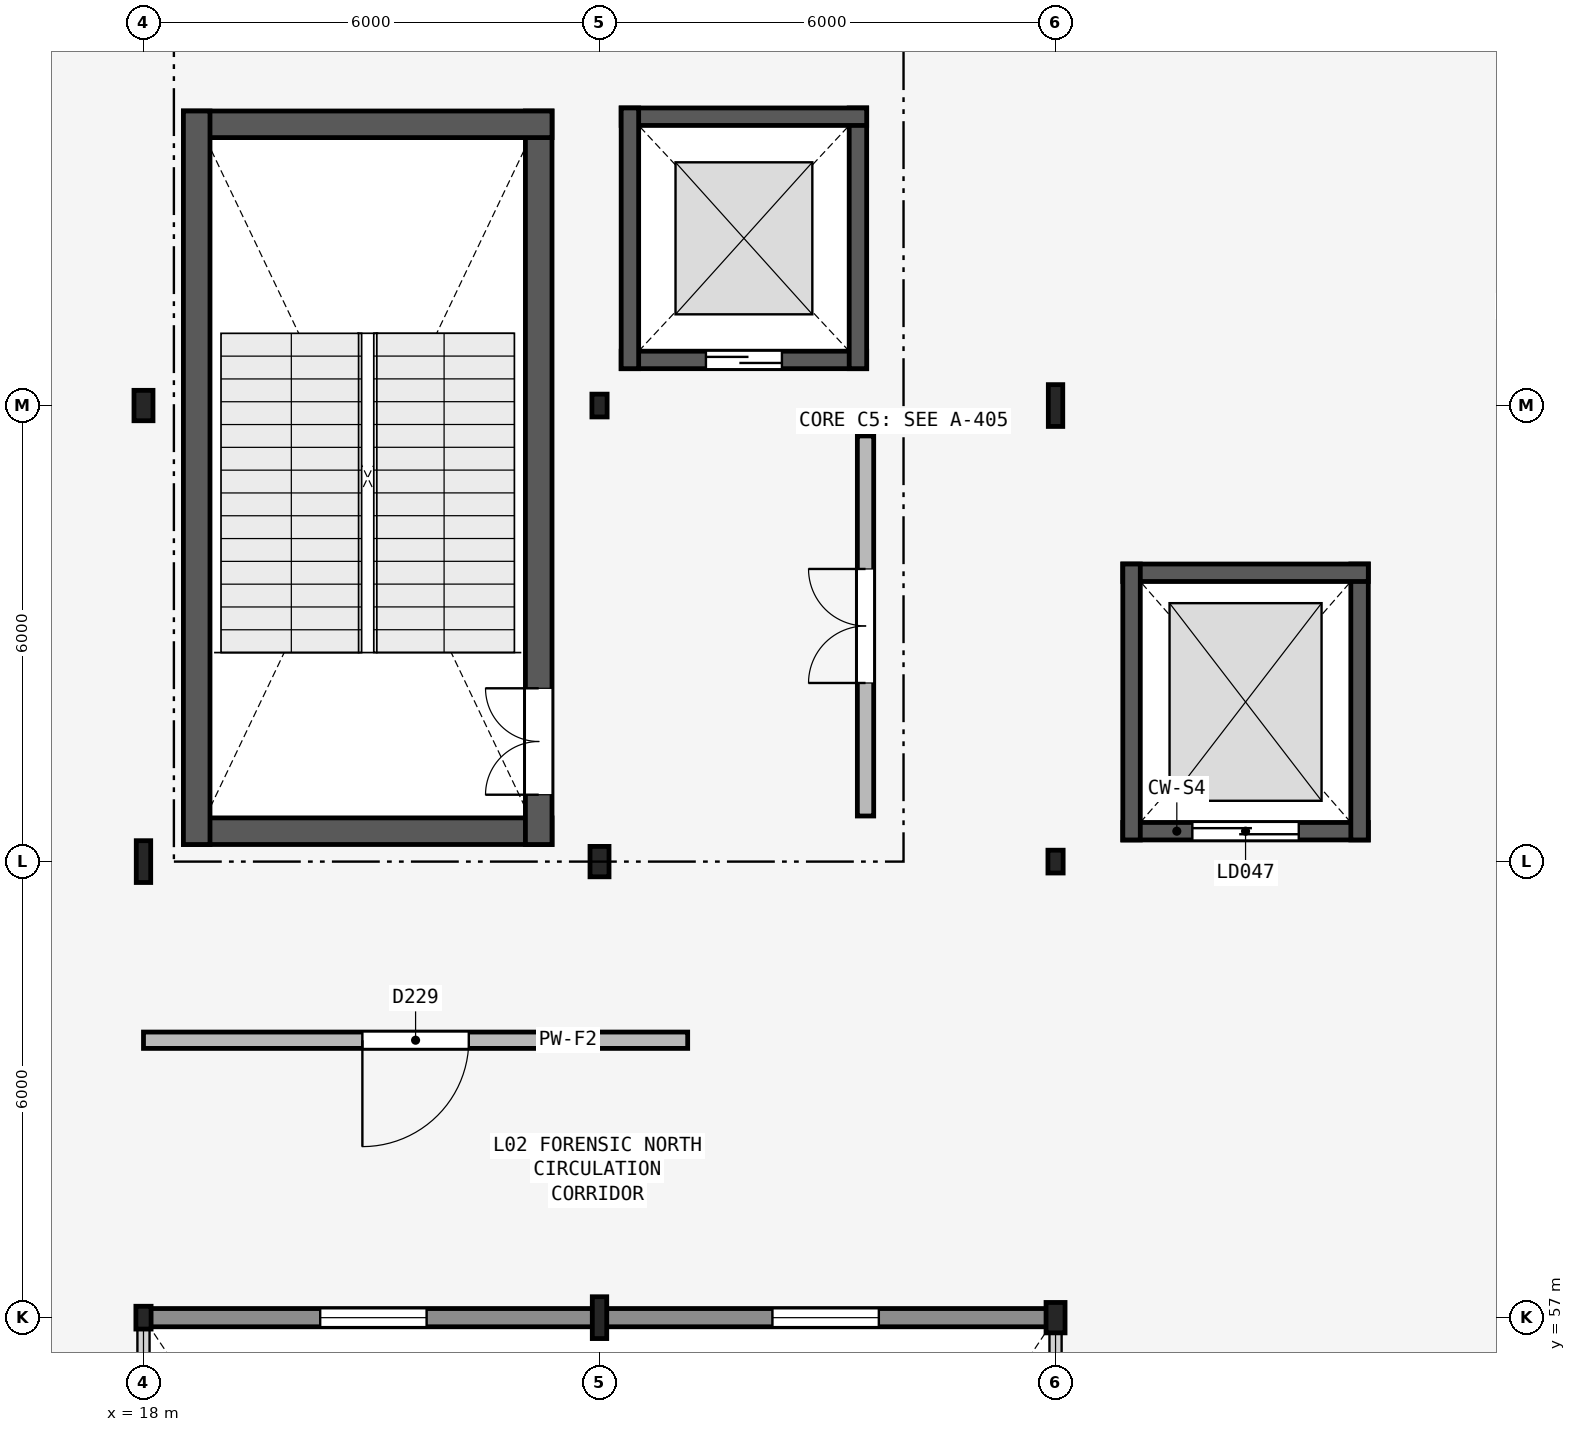
"""IFC4 building model, lengths in metres.
Left out: names, types, materials, properties, quantities, classifications, styles, units other than length and angle.
Written with IfcOpenShell. Run it as: python <this file> out.ifc"""

import sys

from ifc_helpers import new_model, si_unit, direction, frame, frame_2d, origin, origin_2d, place, context, subcontext, project, spatial, rectangle, hollow_rectangle, i_section, extrude, element, fill, save


model = new_model("IFC4")
c1 = context("Model", 3, precision=1e-05, world=origin(), true_north=direction((0.0, 1.0)))
c2 = subcontext(c1, "Body", "Model", "MODEL_VIEW")
j1 = project(units=[si_unit("LENGTHUNIT", "METRE"), si_unit("PLANEANGLEUNIT", "RADIAN")], contexts=[c1])
p1 = place(None, origin())
s1 = spatial("IfcSite", under=j1, at=p1, CompositionType="ELEMENT")
p2 = place(p1, origin())
s2 = spatial("IfcBuilding", under=s1, at=p2, CompositionType="ELEMENT")
p3 = place(p2, frame((0.0, 0.0, 9.3)))
s3 = spatial("IfcBuildingStorey", under=s2, at=p3, CompositionType="ELEMENT", Elevation=9.3)
p4 = place(p3, frame((18.0, 57.0, 0.0), z_axis=(0.0, 0.0, 1.0), x_axis=(1.0, 0.0, 0.0)))
e1 = element("IfcColumn", 1, at=p4, inside=s3, PredefinedType="COLUMN", context=c2, shape_type="SweptSolid", body=[
    extrude(hollow_rectangle(XDim=0.2, YDim=0.3, WallThickness=0.012, InnerFilletRadius=0.012, OuterFilletRadius=0.024, at=origin_2d()), origin(), (0.0, 0.0, 1.0), 4.2),
])
p5 = place(p3, frame((18.0, 63.0, 0.0), z_axis=(0.0, 0.0, 1.0), x_axis=(1.0, 0.0, 0.0)))
e2 = element("IfcColumn", 2, at=p5, inside=s3, PredefinedType="COLUMN", context=c2, shape_type="SweptSolid", body=[
    extrude(i_section(OverallWidth=0.19, OverallDepth=0.55, WebThickness=0.011, FlangeThickness=0.019, FilletRadius=0.018, at=origin_2d()), origin(), (0.0, 0.0, 1.0), 4.2),
])
p6 = place(p3, frame((18.0, 69.0, 0.0), z_axis=(0.0, 0.0, 1.0), x_axis=(1.0, 0.0, 0.0)))
e3 = element("IfcColumn", 3, at=p6, inside=s3, PredefinedType="COLUMN", context=c2, shape_type="SweptSolid", body=[
    extrude(i_section(OverallWidth=0.25, OverallDepth=0.4, WebThickness=0.01, FlangeThickness=0.013, FilletRadius=0.014, at=origin_2d()), origin(), (0.0, 0.0, 1.0), 4.2),
])
p7 = place(p3, frame((24.0, 57.0, 0.0), z_axis=(0.0, 0.0, 1.0), x_axis=(1.0, 0.0, 0.0)))
e4 = element("IfcColumn", 4, at=p7, inside=s3, PredefinedType="COLUMN", context=c2, shape_type="SweptSolid", body=[
    extrude(i_section(OverallWidth=0.19, OverallDepth=0.55, WebThickness=0.011, FlangeThickness=0.019, FilletRadius=0.018, at=origin_2d()), origin(), (0.0, 0.0, 1.0), 4.2),
])
p8 = place(p3, frame((24.0, 63.0, 0.0), z_axis=(0.0, 0.0, 1.0), x_axis=(1.0, 0.0, 0.0)))
e5 = element("IfcColumn", 5, at=p8, inside=s3, PredefinedType="COLUMN", context=c2, shape_type="SweptSolid", body=[
    extrude(i_section(OverallWidth=0.25, OverallDepth=0.4, WebThickness=0.01, FlangeThickness=0.013, FilletRadius=0.014, at=origin_2d()), origin(), (0.0, 0.0, 1.0), 4.2),
])
p9 = place(p3, frame((24.0, 69.0, 0.0), z_axis=(0.0, 0.0, 1.0), x_axis=(1.0, 0.0, 0.0)))
e6 = element("IfcColumn", 6, at=p9, inside=s3, PredefinedType="COLUMN", context=c2, shape_type="SweptSolid", body=[
    extrude(hollow_rectangle(XDim=0.2, YDim=0.3, WallThickness=0.012, InnerFilletRadius=0.012, OuterFilletRadius=0.024, at=origin_2d()), origin(), (0.0, 0.0, 1.0), 4.2),
])
p10 = place(p3, frame((30.0, 57.0, 0.0), z_axis=(0.0, 0.0, 1.0), x_axis=(1.0, 0.0, 0.0)))
e7 = element("IfcColumn", 7, at=p10, inside=s3, PredefinedType="COLUMN", context=c2, shape_type="SweptSolid", body=[
    extrude(i_section(OverallWidth=0.25, OverallDepth=0.4, WebThickness=0.01, FlangeThickness=0.013, FilletRadius=0.014, at=origin_2d()), origin(), (0.0, 0.0, 1.0), 4.2),
])
p11 = place(p3, frame((30.0, 63.0, 0.0), z_axis=(0.0, 0.0, 1.0), x_axis=(1.0, 0.0, 0.0)))
e8 = element("IfcColumn", 8, at=p11, inside=s3, PredefinedType="COLUMN", context=c2, shape_type="SweptSolid", body=[
    extrude(hollow_rectangle(XDim=0.2, YDim=0.3, WallThickness=0.012, InnerFilletRadius=0.012, OuterFilletRadius=0.024, at=origin_2d()), origin(), (0.0, 0.0, 1.0), 4.2),
])
p12 = place(p3, frame((30.0, 69.0, 0.0), z_axis=(0.0, 0.0, 1.0), x_axis=(1.0, 0.0, 0.0)))
e9 = element("IfcColumn", 9, at=p12, inside=s3, PredefinedType="COLUMN", context=c2, shape_type="SweptSolid", body=[
    extrude(i_section(OverallWidth=0.19, OverallDepth=0.55, WebThickness=0.011, FlangeThickness=0.019, FilletRadius=0.018, at=origin_2d()), origin(), (0.0, 0.0, 1.0), 4.2),
])
p13 = place(p3, frame((18.05, 57.0, 0.0), z_axis=(0.0, 0.0, 1.0), x_axis=(1.0, 0.0, 0.0)))
e10 = element("IfcWall", 10, at=p13, inside=s3, PredefinedType="SOLIDWALL", context=c2, shape_type="SweptSolid", body=[
    extrude(rectangle(XDim=5.95, YDim=0.24, at=frame_2d((2.975, 0.0))), origin(), (0.0, 0.0, 1.0), 3.29),
])
p14 = place(p13, frame((2.275, 0.0, 0.85)))
e11 = element("IfcOpeningElement", 11, at=p14, cuts=e10, PredefinedType="OPENING", context=c2, shape_type="SweptSolid", body=[
    extrude(rectangle(XDim=1.4, YDim=1.8, at=frame_2d((0.7, 0.9))), frame((0.0, 0.13, 0.0), z_axis=(0.0, -1.0, 0.0), x_axis=(1.0, 0.0, 0.0)), (0.0, 0.0, 1.0), 0.26),
])
p15 = place(p3, frame((24.0, 57.0, 0.0), z_axis=(0.0, 0.0, 1.0), x_axis=(1.0, 0.0, 0.0)))
e12 = element("IfcWall", 12, at=p15, inside=s3, PredefinedType="SOLIDWALL", context=c2, shape_type="SweptSolid", body=[
    extrude(rectangle(XDim=5.95, YDim=0.24, at=frame_2d((2.975, 0.0))), origin(), (0.0, 0.0, 1.0), 3.29),
])
p16 = place(p15, frame((2.275, 0.0, 0.85)))
e13 = element("IfcOpeningElement", 13, at=p16, cuts=e12, PredefinedType="OPENING", context=c2, shape_type="SweptSolid", body=[
    extrude(rectangle(XDim=1.4, YDim=1.8, at=frame_2d((0.7, 0.9))), frame((0.0, 0.13, 0.0), z_axis=(0.0, -1.0, 0.0), x_axis=(1.0, 0.0, 0.0)), (0.0, 0.0, 1.0), 0.26),
])
p17 = place(p3, frame((18.525, 63.4, 0.0), z_axis=(0.0, 0.0, 1.0), x_axis=(1.0, 0.0, 0.0)))
e14 = element("IfcWall", 14, at=p17, inside=s3, PredefinedType="SHEAR", context=c2, shape_type="SweptSolid", body=[
    extrude(rectangle(XDim=4.85, YDim=0.35, at=frame_2d((2.425, 0.0))), origin(), (0.0, 0.0, 1.0), 4.06),
])
p18 = place(p3, frame((23.2, 63.225, 0.0), z_axis=(0.0, 0.0, 1.0), x_axis=(0.0, 1.0, 0.0)))
e15 = element("IfcWall", 15, at=p18, inside=s3, PredefinedType="SHEAR", context=c2, shape_type="SweptSolid", body=[
    extrude(rectangle(XDim=9.65, YDim=0.35, at=frame_2d((4.825, 0.0))), origin(), (0.0, 0.0, 1.0), 4.06),
])
p19 = place(p18, frame((0.655, 0.0, 0.0)))
e16 = element("IfcOpeningElement", 16, at=p19, cuts=e15, PredefinedType="OPENING", context=c2, shape_type="SweptSolid", body=[
    extrude(rectangle(XDim=1.4, YDim=2.2, at=frame_2d((0.7, 1.1))), frame((0.0, 0.185, 0.0), z_axis=(0.0, -1.0, 0.0), x_axis=(1.0, 0.0, 0.0)), (0.0, 0.0, 1.0), 0.37),
])
p20 = place(p3, frame((23.375, 72.7, 0.0), z_axis=(0.0, 0.0, 1.0), x_axis=(-1.0, 0.0, 0.0)))
e17 = element("IfcWall", 17, at=p20, inside=s3, PredefinedType="SHEAR", context=c2, shape_type="SweptSolid", body=[
    extrude(rectangle(XDim=4.85, YDim=0.35, at=frame_2d((2.425, 0.0))), origin(), (0.0, 0.0, 1.0), 4.06),
])
p21 = place(p3, frame((18.7, 72.875, 0.0), z_axis=(0.0, 0.0, 1.0), x_axis=(0.0, -1.0, 0.0)))
e18 = element("IfcWall", 18, at=p21, inside=s3, PredefinedType="SHEAR", context=c2, shape_type="SweptSolid", body=[
    extrude(rectangle(XDim=9.65, YDim=0.35, at=frame_2d((4.825, 0.0))), origin(), (0.0, 0.0, 1.0), 4.06),
])
p22 = place(p3, frame((27.5, 63.6, 0.0), z_axis=(0.0, 0.0, 1.0), x_axis=(0.0, 1.0, 0.0)))
e19 = element("IfcWall", 19, at=p22, inside=s3, PredefinedType="PARTITIONING", context=c2, shape_type="SweptSolid", body=[
    extrude(rectangle(XDim=5.0, YDim=0.215, at=frame_2d((2.5, 0.0))), origin(), (0.0, 0.0, 1.0), 3.89),
])
p23 = place(p22, frame((1.75, 0.0, 0.0)))
e20 = element("IfcOpeningElement", 20, at=p23, cuts=e19, PredefinedType="OPENING", context=c2, shape_type="SweptSolid", body=[
    extrude(rectangle(XDim=1.5, YDim=2.15, at=frame_2d((0.75, 1.075))), frame((0.0, 0.117, 0.0), z_axis=(0.0, -1.0, 0.0), x_axis=(1.0, 0.0, 0.0)), (0.0, 0.0, 1.0), 0.235),
])
p24 = place(p3, frame((24.285, 69.6, 0.0), z_axis=(0.0, 0.0, 1.0), x_axis=(1.0, 0.0, 0.0)))
e21 = element("IfcWall", 21, at=p24, inside=s3, PredefinedType="SHEAR", context=c2, shape_type="SweptSolid", body=[
    extrude(rectangle(XDim=3.23, YDim=0.23, at=frame_2d((1.615, 0.0))), origin(), (0.0, 0.0, 1.0), 4.2),
])
p25 = place(p24, frame((1.115, 0.0, 0.0)))
e22 = element("IfcOpeningElement", 22, at=p25, cuts=e21, PredefinedType="OPENING", context=c2, shape_type="SweptSolid", body=[
    extrude(rectangle(XDim=1.0, YDim=2.15, at=frame_2d((0.5, 1.075))), frame((0.0, 0.125, 0.0), z_axis=(0.0, -1.0, 0.0), x_axis=(1.0, 0.0, 0.0)), (0.0, 0.0, 1.0), 0.25),
])
p26 = place(p3, frame((27.4, 69.485, 0.0), z_axis=(0.0, 0.0, 1.0), x_axis=(0.0, 1.0, 0.0)))
e23 = element("IfcWall", 23, at=p26, inside=s3, PredefinedType="SHEAR", context=c2, shape_type="SweptSolid", body=[
    extrude(rectangle(XDim=3.43, YDim=0.23, at=frame_2d((1.715, 0.0))), origin(), (0.0, 0.0, 1.0), 4.2),
])
p27 = place(p3, frame((27.515, 72.8, 0.0), z_axis=(0.0, 0.0, 1.0), x_axis=(-1.0, 0.0, 0.0)))
e24 = element("IfcWall", 24, at=p27, inside=s3, PredefinedType="SHEAR", context=c2, shape_type="SweptSolid", body=[
    extrude(rectangle(XDim=3.23, YDim=0.23, at=frame_2d((1.615, 0.0))), origin(), (0.0, 0.0, 1.0), 4.2),
])
p28 = place(p3, frame((24.4, 72.915, 0.0), z_axis=(0.0, 0.0, 1.0), x_axis=(0.0, -1.0, 0.0)))
e25 = element("IfcWall", 25, at=p28, inside=s3, PredefinedType="SHEAR", context=c2, shape_type="SweptSolid", body=[
    extrude(rectangle(XDim=3.43, YDim=0.23, at=frame_2d((1.715, 0.0))), origin(), (0.0, 0.0, 1.0), 4.2),
])
p29 = place(p3, frame((30.885, 63.4, 0.0), z_axis=(0.0, 0.0, 1.0), x_axis=(1.0, 0.0, 0.0)))
e26 = element("IfcWall", 26, at=p29, inside=s3, PredefinedType="SHEAR", context=c2, shape_type="SweptSolid", body=[
    extrude(rectangle(XDim=3.23, YDim=0.23, at=frame_2d((1.615, 0.0))), origin(), (0.0, 0.0, 1.0), 4.2),
])
p30 = place(p29, frame((0.915, 0.0, 0.0)))
e27 = element("IfcOpeningElement", 27, at=p30, cuts=e26, PredefinedType="OPENING", context=c2, shape_type="SweptSolid", body=[
    extrude(rectangle(XDim=1.4, YDim=2.3, at=frame_2d((0.7, 1.15))), frame((0.0, 0.125, 0.0), z_axis=(0.0, -1.0, 0.0), x_axis=(1.0, 0.0, 0.0)), (0.0, 0.0, 1.0), 0.25),
])
p31 = place(p3, frame((34.0, 63.285, 0.0), z_axis=(0.0, 0.0, 1.0), x_axis=(0.0, 1.0, 0.0)))
e28 = element("IfcWall", 28, at=p31, inside=s3, PredefinedType="SHEAR", context=c2, shape_type="SweptSolid", body=[
    extrude(rectangle(XDim=3.63, YDim=0.23, at=frame_2d((1.815, 0.0))), origin(), (0.0, 0.0, 1.0), 4.2),
])
p32 = place(p3, frame((34.115, 66.8, 0.0), z_axis=(0.0, 0.0, 1.0), x_axis=(-1.0, 0.0, 0.0)))
e29 = element("IfcWall", 29, at=p32, inside=s3, PredefinedType="SHEAR", context=c2, shape_type="SweptSolid", body=[
    extrude(rectangle(XDim=3.23, YDim=0.23, at=frame_2d((1.615, 0.0))), origin(), (0.0, 0.0, 1.0), 4.2),
])
p33 = place(p3, frame((31.0, 66.915, 0.0), z_axis=(0.0, 0.0, 1.0), x_axis=(0.0, -1.0, 0.0)))
e30 = element("IfcWall", 30, at=p33, inside=s3, PredefinedType="SHEAR", context=c2, shape_type="SweptSolid", body=[
    extrude(rectangle(XDim=3.63, YDim=0.23, at=frame_2d((1.815, 0.0))), origin(), (0.0, 0.0, 1.0), 4.2),
])
p34 = place(p3, frame((25.16, 60.65, 0.0), z_axis=(0.0, 0.0, 1.0), x_axis=(-1.0, 0.0, 0.0)))
e31 = element("IfcWall", 31, at=p34, inside=s3, PredefinedType="PARTITIONING", context=c2, shape_type="SweptSolid", body=[
    extrude(rectangle(XDim=7.16, YDim=0.215, at=frame_2d((3.58, 0.0))), origin(), (0.0, 0.0, 1.0), 3.49),
])
p35 = place(p34, frame((2.88, 0.0, 0.0)))
e32 = element("IfcOpeningElement", 32, at=p35, cuts=e31, PredefinedType="OPENING", context=c2, shape_type="SweptSolid", body=[
    extrude(rectangle(XDim=1.4, YDim=2.25, at=frame_2d((0.7, 1.125))), frame((0.0, 0.117, 0.0), z_axis=(0.0, -1.0, 0.0), x_axis=(1.0, 0.0, 0.0)), (0.0, 0.0, 1.0), 0.235),
])
p36 = place(p14, origin())
e33 = element("IfcWindow", 33, at=p36, inside=s3, PartitioningType="SINGLE_PANEL", PredefinedType="WINDOW", context=c2, shape_type="SweptSolid", body=[
    extrude(rectangle(XDim=1.4, YDim=1.8, at=frame_2d((0.7, 0.9))), frame((0.0, 0.03, 0.0), z_axis=(0.0, -1.0, 0.0), x_axis=(1.0, 0.0, 0.0)), (0.0, 0.0, 1.0), 0.06),
])
fill(e11, e33)
p37 = place(p16, origin())
e34 = element("IfcWindow", 34, at=p37, inside=s3, PartitioningType="SINGLE_PANEL", PredefinedType="WINDOW", context=c2, shape_type="SweptSolid", body=[
    extrude(rectangle(XDim=1.4, YDim=1.8, at=frame_2d((0.7, 0.9))), frame((0.0, 0.03, 0.0), z_axis=(0.0, -1.0, 0.0), x_axis=(1.0, 0.0, 0.0)), (0.0, 0.0, 1.0), 0.06),
])
fill(e13, e34)
p38 = place(p19, origin())
e35 = element("IfcDoor", 35, at=p38, inside=s3, OperationType="DOUBLE_DOOR_SINGLE_SWING", PredefinedType="DOOR", context=c2, shape_type="SweptSolid", body=[
    extrude(rectangle(XDim=1.4, YDim=2.2, at=frame_2d((0.7, 1.1))), frame((0.0, 0.025, 0.0), z_axis=(0.0, -1.0, 0.0), x_axis=(1.0, 0.0, 0.0)), (0.0, 0.0, 1.0), 0.05),
])
fill(e16, e35)
p39 = place(p23, origin())
e36 = element("IfcDoor", 36, at=p39, inside=s3, OperationType="DOUBLE_DOOR_SINGLE_SWING", PredefinedType="DOOR", context=c2, shape_type="SweptSolid", body=[
    extrude(rectangle(XDim=1.5, YDim=2.15, at=frame_2d((0.75, 1.075))), frame((0.0, 0.025, 0.0), z_axis=(0.0, -1.0, 0.0), x_axis=(1.0, 0.0, 0.0)), (0.0, 0.0, 1.0), 0.05),
])
fill(e20, e36)
p40 = place(p25, origin())
e37 = element("IfcDoor", 37, at=p40, inside=s3, OperationType="SLIDING_TO_LEFT", PredefinedType="DOOR", context=c2, shape_type="SweptSolid", body=[
    extrude(rectangle(XDim=1.0, YDim=2.15, at=frame_2d((0.5, 1.075))), frame((0.0, 0.025, 0.0), z_axis=(0.0, -1.0, 0.0), x_axis=(1.0, 0.0, 0.0)), (0.0, 0.0, 1.0), 0.05),
])
fill(e22, e37)
p41 = place(p30, origin())
e38 = element("IfcDoor", 38, at=p41, inside=s3, OperationType="SLIDING_TO_LEFT", PredefinedType="DOOR", context=c2, shape_type="SweptSolid", body=[
    extrude(rectangle(XDim=1.4, YDim=2.3, at=frame_2d((0.7, 1.15))), frame((0.0, 0.025, 0.0), z_axis=(0.0, -1.0, 0.0), x_axis=(1.0, 0.0, 0.0)), (0.0, 0.0, 1.0), 0.05),
])
fill(e27, e38)
p42 = place(p35, origin())
e39 = element("IfcDoor", 39, at=p42, inside=s3, OperationType="SINGLE_SWING_RIGHT", PredefinedType="DOOR", context=c2, shape_type="SweptSolid", body=[
    extrude(rectangle(XDim=1.4, YDim=2.25, at=frame_2d((0.7, 1.125))), frame((0.0, 0.025, 0.0), z_axis=(0.0, -1.0, 0.0), x_axis=(1.0, 0.0, 0.0)), (0.0, 0.0, 1.0), 0.05),
])
fill(e32, e39)
save(model, sys.argv[1])
